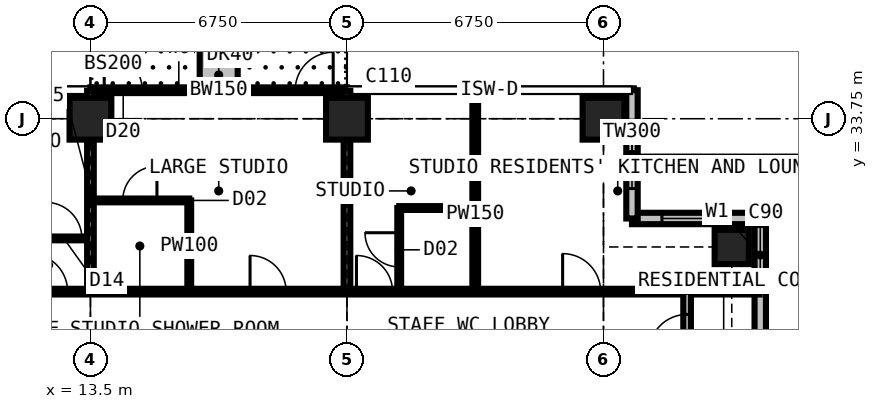
"""IFC4 building model, lengths in metres.
Left out: names, types, materials, properties, quantities, classifications, styles, units other than length and angle.
Written with IfcOpenShell. Run it as: python <this file> out.ifc"""

import sys

from ifc_helpers import new_model, si_unit, direction, frame, frame_2d, origin, origin_2d, place, context, subcontext, project, spatial, rectangle, extrude, element, fill, save


model = new_model("IFC4")
c1 = context("Model", 3, precision=1e-05, world=origin(), true_north=direction((0.0, 1.0)))
c2 = subcontext(c1, "Body", "Model", "MODEL_VIEW")
j1 = project(units=[si_unit("LENGTHUNIT", "METRE"), si_unit("PLANEANGLEUNIT", "RADIAN")], contexts=[c1])
p1 = place(None, origin())
s1 = spatial("IfcSite", under=j1, at=p1, CompositionType="ELEMENT")
p2 = place(p1, origin())
s2 = spatial("IfcBuilding", under=s1, at=p2, CompositionType="ELEMENT")
p3 = place(p2, frame((0.0, 0.0, 225.9)))
s3 = spatial("IfcBuildingStorey", under=s2, at=p3, CompositionType="ELEMENT", Elevation=225.9)
for number, where, z_axis, x_axis in (
    (1, (13.5, 33.75, 0.0), (0.0, 0.0, 1.0), (1.0, 0.0, 0.0)),
    (2, (20.25, 33.75, 0.0), (0.0, 0.0, 1.0), (1.0, 0.0, 0.0)),
    (3, (27.0, 33.75, 0.0), (0.0, 0.0, 1.0), (1.0, 0.0, 0.0)),
):
    element("IfcColumn", number, at=place(p3, frame(where, z_axis=z_axis, x_axis=x_axis)), inside=s3, PredefinedType="COLUMN", context=c2, shape_type="SweptSolid", body=[
        extrude(rectangle(XDim=1.1, YDim=1.1, at=origin_2d()), origin(), (0.0, 0.0, 1.0), 3.6),
    ])
p4 = place(p3, frame((30.375, 30.375, 0.0), z_axis=(0.0, 0.0, 1.0), x_axis=(1.0, 0.0, 0.0)))
e4 = element("IfcColumn", 4, at=p4, inside=s3, PredefinedType="COLUMN", context=c2, shape_type="SweptSolid", body=[
    extrude(rectangle(XDim=0.9, YDim=0.9, at=origin_2d()), origin(), (0.0, 0.0, 1.0), 3.6),
])
p5 = place(p3, frame((31.125, 27.75, 0.0), z_axis=(0.0, 0.0, 1.0), x_axis=(0.0, 1.0, 0.0)))
e5 = element("IfcWall", 5, at=p5, inside=s3, PredefinedType="SOLIDWALL", context=c2, shape_type="SweptSolid", body=[
    extrude(rectangle(XDim=3.375, YDim=0.3, at=frame_2d((1.688, 0.0))), origin(), (0.0, 0.0, 1.0), 3.375),
])
p6 = place(p5, frame((1.663, 0.0, 0.9)))
e6 = element("IfcOpeningElement", 6, at=p6, cuts=e5, PredefinedType="OPENING", context=c2, shape_type="SweptSolid", body=[
    extrude(rectangle(XDim=1.5, YDim=1.8, at=frame_2d((0.75, 0.9))), frame((0.0, 0.16, 0.0), z_axis=(0.0, -1.0, 0.0), x_axis=(1.0, 0.0, 0.0)), (0.0, 0.0, 1.0), 0.32),
])
p7 = place(p3, frame((31.125, 31.125, 0.0), z_axis=(0.0, 0.0, 1.0), x_axis=(-1.0, 0.0, 0.0)))
e7 = element("IfcWall", 7, at=p7, inside=s3, PredefinedType="SOLIDWALL", context=c2, shape_type="SweptSolid", body=[
    extrude(rectangle(XDim=3.375, YDim=0.3, at=frame_2d((1.688, 0.0))), origin(), (0.0, 0.0, 1.0), 3.375),
])
p8 = place(p7, frame((0.788, 0.0, 0.6)))
e8 = element("IfcOpeningElement", 8, at=p8, cuts=e7, PredefinedType="OPENING", context=c2, shape_type="SweptSolid", body=[
    extrude(rectangle(XDim=1.8, YDim=2.1, at=frame_2d((0.9, 1.05))), frame((0.0, 0.16, 0.0), z_axis=(0.0, -1.0, 0.0), x_axis=(1.0, 0.0, 0.0)), (0.0, 0.0, 1.0), 0.32),
])
p9 = place(p3, frame((27.75, 31.125, 0.0), z_axis=(0.0, 0.0, 1.0), x_axis=(0.0, 1.0, 0.0)))
e9 = element("IfcWall", 9, at=p9, inside=s3, PredefinedType="SOLIDWALL", context=c2, shape_type="SweptSolid", body=[
    extrude(rectangle(XDim=3.375, YDim=0.3, at=frame_2d((1.688, 0.0))), origin(), (0.0, 0.0, 1.0), 3.375),
])
p10 = place(p9, frame((0.788, 0.0, 0.6)))
e10 = element("IfcOpeningElement", 10, at=p10, cuts=e9, PredefinedType="OPENING", context=c2, shape_type="SweptSolid", body=[
    extrude(rectangle(XDim=1.8, YDim=2.1, at=frame_2d((0.9, 1.05))), frame((0.0, 0.16, 0.0), z_axis=(0.0, -1.0, 0.0), x_axis=(1.0, 0.0, 0.0)), (0.0, 0.0, 1.0), 0.32),
])
p11 = place(p3, frame((13.5, 34.5, 0.0), z_axis=(0.0, 0.0, 1.0), x_axis=(1.0, 0.0, 0.0)))
e11 = element("IfcWall", 11, at=p11, inside=s3, PredefinedType="SOLIDWALL", context=c2, shape_type="SweptSolid", body=[
    extrude(rectangle(XDim=6.75, YDim=0.15, at=frame_2d((3.375, 0.0))), origin(), (0.0, 0.0, 1.0), 3.375),
])
p12 = place(p11, frame((0.363, 0.0, 0.0)))
e12 = element("IfcOpeningElement", 12, at=p12, cuts=e11, PredefinedType="OPENING", context=c2, shape_type="SweptSolid", body=[
    extrude(rectangle(XDim=1.0, YDim=2.2, at=frame_2d((0.5, 1.1))), frame((0.0, 0.085, 0.0), z_axis=(0.0, -1.0, 0.0), x_axis=(1.0, 0.0, 0.0)), (0.0, 0.0, 1.0), 0.17),
])
p13 = place(p11, frame((1.725, 0.0, 0.9)))
e13 = element("IfcOpeningElement", 13, at=p13, cuts=e11, PredefinedType="OPENING", context=c2, shape_type="SweptSolid", body=[
    extrude(rectangle(XDim=1.2, YDim=1.8, at=frame_2d((0.6, 0.9))), frame((0.0, 0.085, 0.0), z_axis=(0.0, -1.0, 0.0), x_axis=(1.0, 0.0, 0.0)), (0.0, 0.0, 1.0), 0.17),
])
p14 = place(p11, frame((5.387, 0.0, 0.0)))
e14 = element("IfcOpeningElement", 14, at=p14, cuts=e11, PredefinedType="OPENING", context=c2, shape_type="SweptSolid", body=[
    extrude(rectangle(XDim=1.0, YDim=2.2, at=frame_2d((0.5, 1.1))), frame((0.0, 0.085, 0.0), z_axis=(0.0, -1.0, 0.0), x_axis=(1.0, 0.0, 0.0)), (0.0, 0.0, 1.0), 0.17),
])
p15 = place(p11, frame((3.825, 0.0, 0.9)))
e15 = element("IfcOpeningElement", 15, at=p15, cuts=e11, PredefinedType="OPENING", context=c2, shape_type="SweptSolid", body=[
    extrude(rectangle(XDim=1.2, YDim=1.8, at=frame_2d((0.6, 0.9))), frame((0.0, 0.085, 0.0), z_axis=(0.0, -1.0, 0.0), x_axis=(1.0, 0.0, 0.0)), (0.0, 0.0, 1.0), 0.17),
])
p16 = place(p3, frame((16.875, 34.6, 0.0), z_axis=(0.0, 0.0, 1.0), x_axis=(0.0, 1.0, 0.0)))
e16 = element("IfcWall", 16, at=p16, inside=s3, PredefinedType="USERDEFINED", context=c2, shape_type="SweptSolid", body=[
    extrude(rectangle(XDim=2.2, YDim=1.0, at=frame_2d((1.1, 0.0))), origin(), (0.0, 0.0, 1.0), 0.9),
])
p17 = place(p3, frame((10.125, 30.6, 0.0), z_axis=(0.0, 0.0, 1.0), x_axis=(1.0, 0.0, 0.0)))
e17 = element("IfcWall", 17, at=p17, inside=s3, PredefinedType="PARTITIONING", context=c2, shape_type="SweptSolid", body=[
    extrude(rectangle(XDim=3.375, YDim=0.1, at=frame_2d((1.688, 0.0))), origin(), (0.0, 0.0, 1.0), 3.375),
])
p18 = place(p17, frame((2.2, 0.0, 0.0)))
e18 = element("IfcOpeningElement", 18, at=p18, cuts=e17, PredefinedType="OPENING", context=c2, shape_type="SweptSolid", body=[
    extrude(rectangle(XDim=0.95, YDim=2.2, at=frame_2d((0.475, 1.1))), frame((0.0, 0.06, 0.0), z_axis=(0.0, -1.0, 0.0), x_axis=(1.0, 0.0, 0.0)), (0.0, 0.0, 1.0), 0.12),
])
p19 = place(p3, frame((11.3, 29.2, 0.0), z_axis=(0.0, 0.0, 1.0), x_axis=(1.0, 0.0, 0.0)))
e19 = element("IfcWall", 19, at=p19, inside=s3, PredefinedType="PARTITIONING", context=c2, shape_type="SweptSolid", body=[
    extrude(rectangle(XDim=19.809, YDim=0.15, at=frame_2d((9.904, 0.0))), origin(), (0.0, 0.0, 1.0), 3.375),
])
p20 = place(p19, frame((14.625, 0.0, 0.0)))
e20 = element("IfcOpeningElement", 20, at=p20, cuts=e19, PredefinedType="OPENING", context=c2, shape_type="SweptSolid", body=[
    extrude(rectangle(XDim=1.0, YDim=2.2, at=frame_2d((0.5, 1.1))), frame((0.0, 0.085, 0.0), z_axis=(0.0, -1.0, 0.0), x_axis=(1.0, 0.0, 0.0)), (0.0, 0.0, 1.0), 0.17),
])
p21 = place(p19, frame((6.4, 0.0, 0.0)))
e21 = element("IfcOpeningElement", 21, at=p21, cuts=e19, PredefinedType="OPENING", context=c2, shape_type="SweptSolid", body=[
    extrude(rectangle(XDim=0.95, YDim=2.2, at=frame_2d((0.475, 1.1))), frame((0.0, 0.085, 0.0), z_axis=(0.0, -1.0, 0.0), x_axis=(1.0, 0.0, 0.0)), (0.0, 0.0, 1.0), 0.17),
])
p22 = place(p19, frame((9.2, 0.0, 0.0)))
e22 = element("IfcOpeningElement", 22, at=p22, cuts=e19, PredefinedType="OPENING", context=c2, shape_type="SweptSolid", body=[
    extrude(rectangle(XDim=0.95, YDim=2.2, at=frame_2d((0.475, 1.1))), frame((0.0, 0.085, 0.0), z_axis=(0.0, -1.0, 0.0), x_axis=(1.0, 0.0, 0.0)), (0.0, 0.0, 1.0), 0.17),
])
p23 = place(p19, frame((0.6, 0.0, 0.0)))
e23 = element("IfcOpeningElement", 23, at=p23, cuts=e19, PredefinedType="OPENING", context=c2, shape_type="SweptSolid", body=[
    extrude(rectangle(XDim=1.0, YDim=2.2, at=frame_2d((0.5, 1.1))), frame((0.0, 0.085, 0.0), z_axis=(0.0, -1.0, 0.0), x_axis=(1.0, 0.0, 0.0)), (0.0, 0.0, 1.0), 0.17),
])
p24 = place(p3, frame((13.5, 29.2, 0.0), z_axis=(0.0, 0.0, 1.0), x_axis=(0.0, 1.0, 0.0)))
e24 = element("IfcWall", 24, at=p24, inside=s3, PredefinedType="PARTITIONING", context=c2, shape_type="SweptSolid", body=[
    extrude(rectangle(XDim=5.284, YDim=0.175, at=frame_2d((2.642, 0.0))), origin(), (0.0, 0.0, 1.0), 2.877),
])
p25 = place(p3, frame((13.5, 31.6, 0.0), z_axis=(0.0, 0.0, 1.0), x_axis=(1.0, 0.0, 0.0)))
e25 = element("IfcWall", 25, at=p25, inside=s3, PredefinedType="PARTITIONING", context=c2, shape_type="SweptSolid", body=[
    extrude(rectangle(XDim=2.6, YDim=0.1, at=frame_2d((1.3, 0.0))), origin(), (0.0, 0.0, 1.0), 3.375),
])
p26 = place(p25, frame((0.85, 0.0, 0.0)))
e26 = element("IfcOpeningElement", 26, at=p26, cuts=e25, PredefinedType="OPENING", context=c2, shape_type="SweptSolid", body=[
    extrude(rectangle(XDim=0.9, YDim=2.2, at=frame_2d((0.45, 1.1))), frame((0.0, 0.06, 0.0), z_axis=(0.0, -1.0, 0.0), x_axis=(1.0, 0.0, 0.0)), (0.0, 0.0, 1.0), 0.12),
])
p27 = place(p3, frame((16.1, 29.2, 0.0), z_axis=(0.0, 0.0, 1.0), x_axis=(0.0, 1.0, 0.0)))
e27 = element("IfcWall", 27, at=p27, inside=s3, PredefinedType="PARTITIONING", context=c2, shape_type="SweptSolid", body=[
    extrude(rectangle(XDim=2.4, YDim=0.1, at=frame_2d((1.2, 0.0))), origin(), (0.0, 0.0, 1.0), 3.375),
])
p28 = place(p3, frame((20.25, 29.2, 0.0), z_axis=(0.0, 0.0, 1.0), x_axis=(0.0, 1.0, 0.0)))
e28 = element("IfcWall", 28, at=p28, inside=s3, PredefinedType="PARTITIONING", context=c2, shape_type="SweptSolid", body=[
    extrude(rectangle(XDim=5.284, YDim=0.175, at=frame_2d((2.642, 0.0))), origin(), (0.0, 0.0, 1.0), 2.877),
])
p29 = place(p3, frame((21.625, 29.2, 0.0), z_axis=(0.0, 0.0, 1.0), x_axis=(0.0, 1.0, 0.0)))
e29 = element("IfcWall", 29, at=p29, inside=s3, PredefinedType="PARTITIONING", context=c2, shape_type="SweptSolid", body=[
    extrude(rectangle(XDim=2.2, YDim=0.1, at=frame_2d((1.1, 0.0))), origin(), (0.0, 0.0, 1.0), 3.375),
])
p30 = place(p29, frame((0.65, 0.0, 0.0)))
e30 = element("IfcOpeningElement", 30, at=p30, cuts=e29, PredefinedType="OPENING", context=c2, shape_type="SweptSolid", body=[
    extrude(rectangle(XDim=0.9, YDim=2.2, at=frame_2d((0.45, 1.1))), frame((0.0, 0.06, 0.0), z_axis=(0.0, -1.0, 0.0), x_axis=(1.0, 0.0, 0.0)), (0.0, 0.0, 1.0), 0.12),
])
p31 = place(p3, frame((21.625, 31.4, 0.0), z_axis=(0.0, 0.0, 1.0), x_axis=(1.0, 0.0, 0.0)))
e31 = element("IfcWall", 31, at=p31, inside=s3, PredefinedType="PARTITIONING", context=c2, shape_type="SweptSolid", body=[
    extrude(rectangle(XDim=2.0, YDim=0.1, at=frame_2d((1.0, 0.0))), origin(), (0.0, 0.0, 1.0), 3.375),
])
p32 = place(p3, frame((23.625, 29.2, 0.0), z_axis=(0.0, 0.0, 1.0), x_axis=(0.0, 1.0, 0.0)))
e32 = element("IfcWall", 32, at=p32, inside=s3, PredefinedType="PARTITIONING", context=c2, shape_type="SweptSolid", body=[
    extrude(rectangle(XDim=5.284, YDim=0.15, at=frame_2d((2.642, 0.0))), origin(), (0.0, 0.0, 1.0), 3.375),
])
p33 = place(p3, frame((29.2, 11.3, 0.0), z_axis=(0.0, 0.0, 1.0), x_axis=(0.0, 1.0, 0.0)))
e33 = element("IfcWall", 33, at=p33, inside=s3, PredefinedType="PARTITIONING", context=c2, shape_type="SweptSolid", body=[
    extrude(rectangle(XDim=17.9, YDim=0.2, at=frame_2d((8.95, 0.0))), origin(), (0.0, 0.0, 1.0), 3.375),
])
p34 = place(p33, frame((0.6, 0.0, 0.0)))
e34 = element("IfcOpeningElement", 34, at=p34, cuts=e33, PredefinedType="OPENING", context=c2, shape_type="SweptSolid", body=[
    extrude(rectangle(XDim=1.0, YDim=2.2, at=frame_2d((0.5, 1.1))), frame((0.0, 0.11, 0.0), z_axis=(0.0, -1.0, 0.0), x_axis=(1.0, 0.0, 0.0)), (0.0, 0.0, 1.0), 0.22),
])
p35 = place(p33, frame((2.4, 0.0, 0.0)))
e35 = element("IfcOpeningElement", 35, at=p35, cuts=e33, PredefinedType="OPENING", context=c2, shape_type="SweptSolid", body=[
    extrude(rectangle(XDim=0.95, YDim=2.2, at=frame_2d((0.475, 1.1))), frame((0.0, 0.11, 0.0), z_axis=(0.0, -1.0, 0.0), x_axis=(1.0, 0.0, 0.0)), (0.0, 0.0, 1.0), 0.22),
])
p36 = place(p33, frame((5.825, 0.0, 0.0)))
e36 = element("IfcOpeningElement", 36, at=p36, cuts=e33, PredefinedType="OPENING", context=c2, shape_type="SweptSolid", body=[
    extrude(rectangle(XDim=0.95, YDim=2.2, at=frame_2d((0.475, 1.1))), frame((0.0, 0.11, 0.0), z_axis=(0.0, -1.0, 0.0), x_axis=(1.0, 0.0, 0.0)), (0.0, 0.0, 1.0), 0.22),
])
p37 = place(p33, frame((9.2, 0.0, 0.0)))
e37 = element("IfcOpeningElement", 37, at=p37, cuts=e33, PredefinedType="OPENING", context=c2, shape_type="SweptSolid", body=[
    extrude(rectangle(XDim=0.95, YDim=2.2, at=frame_2d((0.475, 1.1))), frame((0.0, 0.11, 0.0), z_axis=(0.0, -1.0, 0.0), x_axis=(1.0, 0.0, 0.0)), (0.0, 0.0, 1.0), 0.22),
])
p38 = place(p33, frame((12.575, 0.0, 0.0)))
e38 = element("IfcOpeningElement", 38, at=p38, cuts=e33, PredefinedType="OPENING", context=c2, shape_type="SweptSolid", body=[
    extrude(rectangle(XDim=0.95, YDim=2.2, at=frame_2d((0.475, 1.1))), frame((0.0, 0.11, 0.0), z_axis=(0.0, -1.0, 0.0), x_axis=(1.0, 0.0, 0.0)), (0.0, 0.0, 1.0), 0.22),
])
p39 = place(p33, frame((16.3, 0.0, 0.0)))
e39 = element("IfcOpeningElement", 39, at=p39, cuts=e33, PredefinedType="OPENING", context=c2, shape_type="SweptSolid", body=[
    extrude(rectangle(XDim=1.0, YDim=2.2, at=frame_2d((0.5, 1.1))), frame((0.0, 0.11, 0.0), z_axis=(0.0, -1.0, 0.0), x_axis=(1.0, 0.0, 0.0)), (0.0, 0.0, 1.0), 0.22),
])
p40 = place(p6, origin())
e40 = element("IfcWindow", 40, at=p40, inside=s3, PartitioningType="SINGLE_PANEL", PredefinedType="WINDOW", context=c2, shape_type="SweptSolid", body=[
    extrude(rectangle(XDim=1.5, YDim=1.8, at=frame_2d((0.75, 0.9))), frame((0.0, 0.03, 0.0), z_axis=(0.0, -1.0, 0.0), x_axis=(1.0, 0.0, 0.0)), (0.0, 0.0, 1.0), 0.06),
])
fill(e6, e40)
p41 = place(p8, origin())
e41 = element("IfcWindow", 41, at=p41, inside=s3, PartitioningType="SINGLE_PANEL", PredefinedType="WINDOW", context=c2, shape_type="SweptSolid", body=[
    extrude(rectangle(XDim=1.8, YDim=2.1, at=frame_2d((0.9, 1.05))), frame((0.0, 0.03, 0.0), z_axis=(0.0, -1.0, 0.0), x_axis=(1.0, 0.0, 0.0)), (0.0, 0.0, 1.0), 0.06),
])
fill(e8, e41)
p42 = place(p10, origin())
e42 = element("IfcWindow", 42, at=p42, inside=s3, PartitioningType="SINGLE_PANEL", PredefinedType="WINDOW", context=c2, shape_type="SweptSolid", body=[
    extrude(rectangle(XDim=1.8, YDim=2.1, at=frame_2d((0.9, 1.05))), frame((0.0, 0.03, 0.0), z_axis=(0.0, -1.0, 0.0), x_axis=(1.0, 0.0, 0.0)), (0.0, 0.0, 1.0), 0.06),
])
fill(e10, e42)
p43 = place(p12, origin())
e43 = element("IfcDoor", 43, at=p43, inside=s3, OperationType="SINGLE_SWING_LEFT", PredefinedType="DOOR", context=c2, shape_type="SweptSolid", body=[
    extrude(rectangle(XDim=1.0, YDim=2.2, at=frame_2d((0.5, 1.1))), frame((0.0, 0.025, 0.0), z_axis=(0.0, -1.0, 0.0), x_axis=(1.0, 0.0, 0.0)), (0.0, 0.0, 1.0), 0.05),
])
fill(e12, e43)
p44 = place(p13, origin())
e44 = element("IfcWindow", 44, at=p44, inside=s3, PartitioningType="SINGLE_PANEL", PredefinedType="WINDOW", context=c2, shape_type="SweptSolid", body=[
    extrude(rectangle(XDim=1.2, YDim=1.8, at=frame_2d((0.6, 0.9))), frame((0.0, 0.03, 0.0), z_axis=(0.0, -1.0, 0.0), x_axis=(1.0, 0.0, 0.0)), (0.0, 0.0, 1.0), 0.06),
])
fill(e13, e44)
p45 = place(p14, origin())
e45 = element("IfcDoor", 45, at=p45, inside=s3, OperationType="SINGLE_SWING_RIGHT", PredefinedType="DOOR", context=c2, shape_type="SweptSolid", body=[
    extrude(rectangle(XDim=1.0, YDim=2.2, at=frame_2d((0.5, 1.1))), frame((0.0, 0.025, 0.0), z_axis=(0.0, -1.0, 0.0), x_axis=(1.0, 0.0, 0.0)), (0.0, 0.0, 1.0), 0.05),
])
fill(e14, e45)
p46 = place(p15, origin())
e46 = element("IfcWindow", 46, at=p46, inside=s3, PartitioningType="SINGLE_PANEL", PredefinedType="WINDOW", context=c2, shape_type="SweptSolid", body=[
    extrude(rectangle(XDim=1.2, YDim=1.8, at=frame_2d((0.6, 0.9))), frame((0.0, 0.03, 0.0), z_axis=(0.0, -1.0, 0.0), x_axis=(1.0, 0.0, 0.0)), (0.0, 0.0, 1.0), 0.06),
])
fill(e15, e46)
p47 = place(p39, origin())
e47 = element("IfcDoor", 47, at=p47, inside=s3, OperationType="SINGLE_SWING_LEFT", PredefinedType="DOOR", context=c2, shape_type="SweptSolid", body=[
    extrude(rectangle(XDim=1.0, YDim=2.2, at=frame_2d((0.5, 1.1))), frame((0.0, 0.025, 0.0), z_axis=(0.0, -1.0, 0.0), x_axis=(1.0, 0.0, 0.0)), (0.0, 0.0, 1.0), 0.05),
])
fill(e39, e47)
p48 = place(p20, origin())
e48 = element("IfcDoor", 48, at=p48, inside=s3, OperationType="SINGLE_SWING_LEFT", PredefinedType="DOOR", context=c2, shape_type="SweptSolid", body=[
    extrude(rectangle(XDim=1.0, YDim=2.2, at=frame_2d((0.5, 1.1))), frame((0.0, 0.025, 0.0), z_axis=(0.0, -1.0, 0.0), x_axis=(1.0, 0.0, 0.0)), (0.0, 0.0, 1.0), 0.05),
])
fill(e20, e48)
p49 = place(p21, origin())
e49 = element("IfcDoor", 49, at=p49, inside=s3, OperationType="SINGLE_SWING_LEFT", PredefinedType="DOOR", context=c2, shape_type="SweptSolid", body=[
    extrude(rectangle(XDim=0.95, YDim=2.2, at=frame_2d((0.475, 1.1))), frame((0.0, 0.025, 0.0), z_axis=(0.0, -1.0, 0.0), x_axis=(1.0, 0.0, 0.0)), (0.0, 0.0, 1.0), 0.05),
])
fill(e21, e49)
p50 = place(p26, origin())
e50 = element("IfcDoor", 50, at=p50, inside=s3, OperationType="SINGLE_SWING_RIGHT", PredefinedType="DOOR", context=c2, shape_type="SweptSolid", body=[
    extrude(rectangle(XDim=0.9, YDim=2.2, at=frame_2d((0.45, 1.1))), frame((0.0, 0.025, 0.0), z_axis=(0.0, -1.0, 0.0), x_axis=(1.0, 0.0, 0.0)), (0.0, 0.0, 1.0), 0.05),
])
fill(e26, e50)
p51 = place(p18, origin())
e51 = element("IfcDoor", 51, at=p51, inside=s3, OperationType="SINGLE_SWING_LEFT", PredefinedType="DOOR", context=c2, shape_type="SweptSolid", body=[
    extrude(rectangle(XDim=0.95, YDim=2.2, at=frame_2d((0.475, 1.1))), frame((0.0, 0.025, 0.0), z_axis=(0.0, -1.0, 0.0), x_axis=(1.0, 0.0, 0.0)), (0.0, 0.0, 1.0), 0.05),
])
fill(e18, e51)
p52 = place(p22, origin())
e52 = element("IfcDoor", 52, at=p52, inside=s3, OperationType="SINGLE_SWING_LEFT", PredefinedType="DOOR", context=c2, shape_type="SweptSolid", body=[
    extrude(rectangle(XDim=0.95, YDim=2.2, at=frame_2d((0.475, 1.1))), frame((0.0, 0.025, 0.0), z_axis=(0.0, -1.0, 0.0), x_axis=(1.0, 0.0, 0.0)), (0.0, 0.0, 1.0), 0.05),
])
fill(e22, e52)
p53 = place(p30, origin())
e53 = element("IfcDoor", 53, at=p53, inside=s3, OperationType="SINGLE_SWING_RIGHT", PredefinedType="DOOR", context=c2, shape_type="SweptSolid", body=[
    extrude(rectangle(XDim=0.9, YDim=2.2, at=frame_2d((0.45, 1.1))), frame((0.0, 0.025, 0.0), z_axis=(0.0, -1.0, 0.0), x_axis=(1.0, 0.0, 0.0)), (0.0, 0.0, 1.0), 0.05),
])
fill(e30, e53)
p54 = place(p23, origin())
e54 = element("IfcDoor", 54, at=p54, inside=s3, OperationType="SINGLE_SWING_LEFT", PredefinedType="DOOR", context=c2, shape_type="SweptSolid", body=[
    extrude(rectangle(XDim=1.0, YDim=2.2, at=frame_2d((0.5, 1.1))), frame((0.0, 0.025, 0.0), z_axis=(0.0, -1.0, 0.0), x_axis=(1.0, 0.0, 0.0)), (0.0, 0.0, 1.0), 0.05),
])
fill(e23, e54)
save(model, sys.argv[1])
